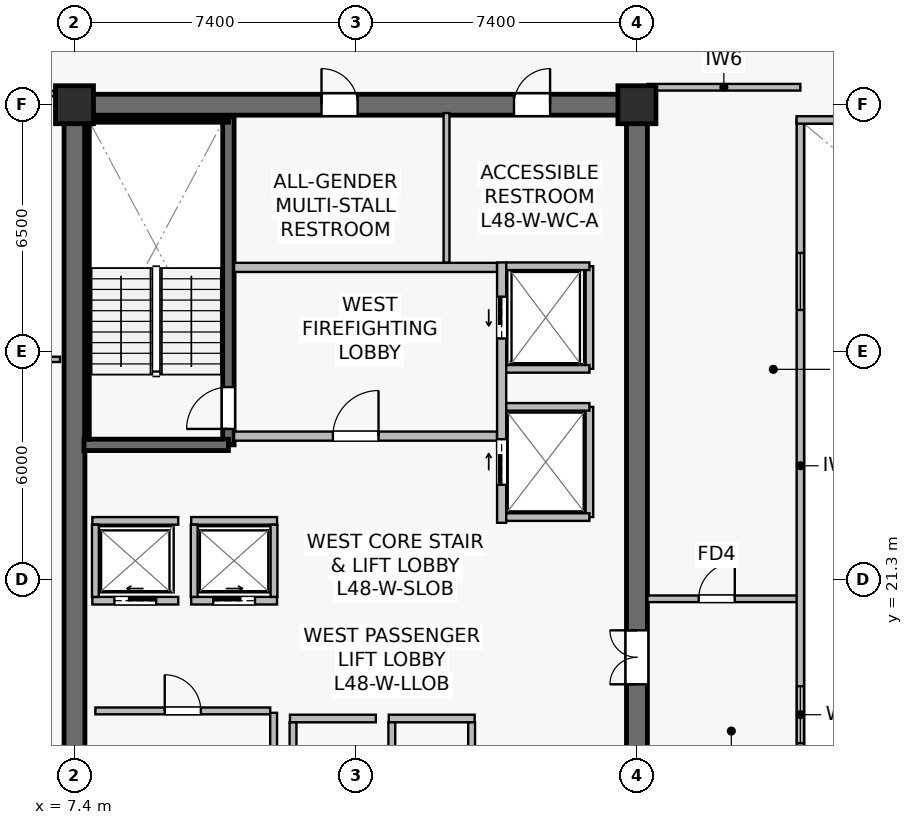
"""IFC4 building model, lengths in metres.
Left out: names, types, materials, properties, quantities, classifications, styles, units other than length and angle.
Written with IfcOpenShell. Run it as: python <this file> out.ifc"""

import sys

from ifc_helpers import new_model, si_unit, direction, frame, frame_2d, origin, origin_2d, place, context, subcontext, project, spatial, rectangle, extrude, source, transform, mapped, element, fill, save


model = new_model("IFC4")
c1 = context("Model", 3, precision=1e-05, world=origin(), true_north=direction((0.0, 1.0)))
c2 = subcontext(c1, "Body", "Model", "MODEL_VIEW")
j1 = project(units=[si_unit("LENGTHUNIT", "METRE"), si_unit("PLANEANGLEUNIT", "RADIAN")], contexts=[c1])
p1 = place(None, origin())
s1 = spatial("IfcSite", under=j1, at=p1, CompositionType="ELEMENT")
p2 = place(p1, origin())
s2 = spatial("IfcBuilding", under=s1, at=p2, CompositionType="ELEMENT")
p3 = place(p2, frame((0.0, 0.0, 201.4)))
s3 = spatial("IfcBuildingStorey", under=s2, at=p3, CompositionType="ELEMENT", Elevation=201.4)
p4 = place(p3, frame((7.125, 33.8, 0.0), z_axis=(0.0, 0.0, 1.0), x_axis=(1.0, 0.0, 0.0)))
e1 = element("IfcWall", 1, at=p4, inside=s3, PredefinedType="SHEAR", context=c2, shape_type="SweptSolid", body=[
    extrude(rectangle(XDim=15.35, YDim=0.55, at=frame_2d((7.675, 0.0))), origin(), (0.0, 0.0, 1.0), 3.8),
])
p5 = place(p4, frame((6.775, 0.0, 0.0)))
e2 = element("IfcOpeningElement", 2, at=p5, cuts=e1, PredefinedType="OPENING", context=c2, shape_type="SweptSolid", body=[
    extrude(rectangle(XDim=0.95, YDim=2.15, at=frame_2d((0.475, 1.075))), frame((0.0, 0.285, 0.0), z_axis=(0.0, -1.0, 0.0), x_axis=(1.0, 0.0, 0.0)), (0.0, 0.0, 1.0), 0.57),
])
p6 = place(p4, frame((11.84, 0.0, 0.0)))
e3 = element("IfcOpeningElement", 3, at=p6, cuts=e1, PredefinedType="OPENING", context=c2, shape_type="SweptSolid", body=[
    extrude(rectangle(XDim=0.95, YDim=2.15, at=frame_2d((0.475, 1.075))), frame((0.0, 0.285, 0.0), z_axis=(0.0, -1.0, 0.0), x_axis=(1.0, 0.0, 0.0)), (0.0, 0.0, 1.0), 0.57),
])
p7 = place(p3, frame((7.4, 15.075, 0.0), z_axis=(0.0, 0.0, 1.0), x_axis=(0.0, 1.0, 0.0)))
e4 = element("IfcWall", 4, at=p7, inside=s3, PredefinedType="SHEAR", context=c2, shape_type="SweptSolid", body=[
    extrude(rectangle(XDim=18.45, YDim=0.55, at=frame_2d((9.225, 0.0))), origin(), (0.0, 0.0, 1.0), 3.8),
])
p8 = place(p3, frame((22.2, 15.075, 0.0), z_axis=(0.0, 0.0, 1.0), x_axis=(0.0, 1.0, 0.0)))
e5 = element("IfcWall", 5, at=p8, inside=s3, PredefinedType="SHEAR", context=c2, shape_type="SweptSolid", body=[
    extrude(rectangle(XDim=18.45, YDim=0.55, at=frame_2d((9.225, 0.0))), origin(), (0.0, 0.0, 1.0), 3.8),
])
p9 = place(p8, frame((3.475, 0.0, 0.0)))
e6 = element("IfcOpeningElement", 6, at=p9, cuts=e5, PredefinedType="OPENING", context=c2, shape_type="SweptSolid", body=[
    extrude(rectangle(XDim=1.42, YDim=2.2, at=frame_2d((0.71, 1.1))), frame((0.0, 0.285, 0.0), z_axis=(0.0, -1.0, 0.0), x_axis=(1.0, 0.0, 0.0)), (0.0, 0.0, 1.0), 0.57),
])
p10 = place(p3, frame((11.45, 24.85, 0.0), z_axis=(0.0, 0.0, 1.0), x_axis=(0.0, 1.0, 0.0)))
e7 = element("IfcWall", 7, at=p10, inside=s3, PredefinedType="SHEAR", context=c2, shape_type="SweptSolid", body=[
    extrude(rectangle(XDim=8.63, YDim=0.3, at=frame_2d((4.315, 0.0))), origin(), (0.0, 0.0, 1.0), 3.8),
])
p11 = place(p10, frame((0.42, 0.0, 0.0)))
e8 = element("IfcOpeningElement", 8, at=p11, cuts=e7, PredefinedType="OPENING", context=c2, shape_type="SweptSolid", body=[
    extrude(rectangle(XDim=1.1, YDim=2.15, at=frame_2d((0.55, 1.075))), frame((0.0, 0.16, 0.0), z_axis=(0.0, -1.0, 0.0), x_axis=(1.0, 0.0, 0.0)), (0.0, 0.0, 1.0), 0.32),
])
p12 = place(p3, frame((7.65, 24.85, 0.0), z_axis=(0.0, 0.0, 1.0), x_axis=(1.0, 0.0, 0.0)))
e9 = element("IfcWall", 9, at=p12, inside=s3, PredefinedType="SHEAR", context=c2, shape_type="SweptSolid", body=[
    extrude(rectangle(XDim=3.8, YDim=0.3, at=frame_2d((1.9, 0.0))), origin(), (0.0, 0.0, 1.0), 3.8),
])
p13 = place(p3, frame((7.73, 33.4, 0.0), z_axis=(0.0, 0.0, 1.0), x_axis=(1.0, 0.0, 0.0)))
e10 = element("IfcWall", 10, at=p13, inside=s3, PredefinedType="SOLIDWALL", context=c2, shape_type="SweptSolid", body=[
    extrude(rectangle(XDim=3.72, YDim=0.12, at=frame_2d((1.86, 0.0))), origin(), (0.0, 0.0, 1.0), 3.8),
])
p14 = place(p3, frame((7.73, 25.0, 0.0), z_axis=(0.0, 0.0, 1.0), x_axis=(0.0, 1.0, 0.0)))
e11 = element("IfcWall", 11, at=p14, inside=s3, PredefinedType="SOLIDWALL", context=c2, shape_type="SweptSolid", body=[
    extrude(rectangle(XDim=8.32, YDim=0.12, at=frame_2d((4.16, 0.0))), origin(), (0.0, 0.0, 1.0), 3.8),
])
m1 = source(origin(), c2, "Body", "SweptSolid", [
    extrude(rectangle(XDim=1.0, YDim=1.0, at=origin_2d()), origin(), (0.0, 0.0, 1.0), 4.1),
])
for number, where, z_axis, x_axis in (
    (12, (7.4, 33.8, 0.0), (0.0, 0.0, 1.0), (1.0, 0.0, 0.0)),
    (13, (22.2, 33.8, 0.0), (0.0, 0.0, 1.0), (1.0, 0.0, 0.0)),
):
    element("IfcColumn", number, at=place(p3, frame(where, z_axis=z_axis, x_axis=x_axis)), inside=s3, PredefinedType="COLUMN", context=c2, shape_type="MappedRepresentation", body=[
        mapped(m1, transform((0.0, 0.0, 0.0), scale=1.0)),
    ])
p15 = place(p3, frame((11.6, 25.08, 0.0), z_axis=(0.0, 0.0, 1.0), x_axis=(1.0, 0.0, 0.0)))
e14 = element("IfcWall", 14, at=p15, inside=s3, PredefinedType="SOLIDWALL", context=c2, shape_type="SweptSolid", body=[
    extrude(rectangle(XDim=6.92, YDim=0.24, at=frame_2d((3.46, 0.0))), origin(), (0.0, 0.0, 1.0), 3.197),
])
p16 = place(p15, frame((2.6, 0.0, 0.0)))
e15 = element("IfcOpeningElement", 15, at=p16, cuts=e14, PredefinedType="OPENING", context=c2, shape_type="SweptSolid", body=[
    extrude(rectangle(XDim=1.2, YDim=2.16, at=frame_2d((0.6, 1.08))), frame((0.0, 0.13, 0.0), z_axis=(0.0, -1.0, 0.0), x_axis=(1.0, 0.0, 0.0)), (0.0, 0.0, 1.0), 0.26),
])
p17 = place(p3, frame((11.6, 29.52, 0.0), z_axis=(0.0, 0.0, 1.0), x_axis=(1.0, 0.0, 0.0)))
e16 = element("IfcWall", 16, at=p17, inside=s3, PredefinedType="SOLIDWALL", context=c2, shape_type="SweptSolid", body=[
    extrude(rectangle(XDim=6.92, YDim=0.24, at=frame_2d((3.46, 0.0))), origin(), (0.0, 0.0, 1.0), 3.197),
])
p18 = place(p3, frame((18.64, 22.8, 0.0), z_axis=(0.0, 0.0, 1.0), x_axis=(0.0, 1.0, 0.0)))
e17 = element("IfcWall", 17, at=p18, inside=s3, PredefinedType="SOLIDWALL", context=c2, shape_type="SweptSolid", body=[
    extrude(rectangle(XDim=6.85, YDim=0.24, at=frame_2d((3.425, 0.0))), origin(), (0.0, 0.0, 1.0), 2.935),
])
p19 = place(p18, frame((4.85, 0.0, 0.0)))
e18 = element("IfcOpeningElement", 18, at=p19, cuts=e17, PredefinedType="OPENING", context=c2, shape_type="SweptSolid", body=[
    extrude(rectangle(XDim=1.1, YDim=2.22, at=frame_2d((0.55, 1.11))), frame((0.0, 0.13, 0.0), z_axis=(0.0, -1.0, 0.0), x_axis=(1.0, 0.0, 0.0)), (0.0, 0.0, 1.0), 0.26),
])
p20 = place(p18, frame((1.0, 0.0, 0.0)))
e19 = element("IfcOpeningElement", 19, at=p20, cuts=e17, PredefinedType="OPENING", context=c2, shape_type="SweptSolid", body=[
    extrude(rectangle(XDim=1.2, YDim=2.22, at=frame_2d((0.6, 1.11))), frame((0.0, 0.13, 0.0), z_axis=(0.0, -1.0, 0.0), x_axis=(1.0, 0.0, 0.0)), (0.0, 0.0, 1.0), 0.26),
])
p21 = place(p3, frame((13.07, 17.65, 0.0), z_axis=(0.0, 0.0, 1.0), x_axis=(1.0, 0.0, 0.0)))
e20 = element("IfcWall", 20, at=p21, inside=s3, PredefinedType="SOLIDWALL", context=c2, shape_type="SweptSolid", body=[
    extrude(rectangle(XDim=2.26, YDim=0.2, at=frame_2d((1.13, 0.0))), origin(), (0.0, 0.0, 1.0), 3.197),
])
p22 = place(p3, frame((13.15, 15.65, 0.0), z_axis=(0.0, 0.0, 1.0), x_axis=(0.0, 1.0, 0.0)))
e21 = element("IfcWall", 21, at=p22, inside=s3, PredefinedType="SOLIDWALL", context=c2, shape_type="SweptSolid", body=[
    extrude(rectangle(XDim=1.9, YDim=0.18, at=frame_2d((0.95, 0.0))), origin(), (0.0, 0.0, 1.0), 3.8),
])
p23 = place(p3, frame((15.67, 17.65, 0.0), z_axis=(0.0, 0.0, 1.0), x_axis=(1.0, 0.0, 0.0)))
e22 = element("IfcWall", 22, at=p23, inside=s3, PredefinedType="SOLIDWALL", context=c2, shape_type="SweptSolid", body=[
    extrude(rectangle(XDim=2.26, YDim=0.2, at=frame_2d((1.13, 0.0))), origin(), (0.0, 0.0, 1.0), 3.8),
])
for number, where, z_axis, x_axis in (
    (23, (15.75, 15.65, 0.0), (0.0, 0.0, 1.0), (0.0, 1.0, 0.0)),
    (24, (17.85, 15.65, 0.0), (0.0, 0.0, 1.0), (0.0, 1.0, 0.0)),
):
    element("IfcWall", number, at=place(p3, frame(where, z_axis=z_axis, x_axis=x_axis)), inside=s3, PredefinedType="SOLIDWALL", context=c2, shape_type="SweptSolid", body=[
        extrude(rectangle(XDim=1.9, YDim=0.18, at=frame_2d((0.95, 0.0))), origin(), (0.0, 0.0, 1.0), 3.8),
    ])
p24 = place(p3, frame((7.87, 20.75, 0.0), z_axis=(0.0, 0.0, 1.0), x_axis=(1.0, 0.0, 0.0)))
e25 = element("IfcWall", 25, at=p24, inside=s3, PredefinedType="SOLIDWALL", context=c2, shape_type="SweptSolid", body=[
    extrude(rectangle(XDim=2.26, YDim=0.2, at=frame_2d((1.13, 0.0))), origin(), (0.0, 0.0, 1.0), 3.8),
])
p25 = place(p24, frame((0.58, 0.0, 0.0)))
e26 = element("IfcOpeningElement", 26, at=p25, cuts=e25, PredefinedType="OPENING", context=c2, shape_type="SweptSolid", body=[
    extrude(rectangle(XDim=1.1, YDim=2.22, at=frame_2d((0.55, 1.11))), frame((0.0, 0.11, 0.0), z_axis=(0.0, -1.0, 0.0), x_axis=(1.0, 0.0, 0.0)), (0.0, 0.0, 1.0), 0.22),
])
p26 = place(p3, frame((7.87, 22.85, 0.0), z_axis=(0.0, 0.0, 1.0), x_axis=(1.0, 0.0, 0.0)))
e27 = element("IfcWall", 27, at=p26, inside=s3, PredefinedType="SOLIDWALL", context=c2, shape_type="SweptSolid", body=[
    extrude(rectangle(XDim=2.26, YDim=0.2, at=frame_2d((1.13, 0.0))), origin(), (0.0, 0.0, 1.0), 3.8),
])
p27 = place(p3, frame((7.95, 20.85, 0.0), z_axis=(0.0, 0.0, 1.0), x_axis=(0.0, 1.0, 0.0)))
e28 = element("IfcWall", 28, at=p27, inside=s3, PredefinedType="SOLIDWALL", context=c2, shape_type="SweptSolid", body=[
    extrude(rectangle(XDim=1.9, YDim=0.18, at=frame_2d((0.95, 0.0))), origin(), (0.0, 0.0, 1.0), 3.8),
])
p28 = place(p3, frame((10.47, 20.75, 0.0), z_axis=(0.0, 0.0, 1.0), x_axis=(1.0, 0.0, 0.0)))
e29 = element("IfcWall", 29, at=p28, inside=s3, PredefinedType="SOLIDWALL", context=c2, shape_type="SweptSolid", body=[
    extrude(rectangle(XDim=2.26, YDim=0.2, at=frame_2d((1.13, 0.0))), origin(), (0.0, 0.0, 1.0), 3.8),
])
p29 = place(p28, frame((0.58, 0.0, 0.0)))
e30 = element("IfcOpeningElement", 30, at=p29, cuts=e29, PredefinedType="OPENING", context=c2, shape_type="SweptSolid", body=[
    extrude(rectangle(XDim=1.1, YDim=2.22, at=frame_2d((0.55, 1.11))), frame((0.0, 0.11, 0.0), z_axis=(0.0, -1.0, 0.0), x_axis=(1.0, 0.0, 0.0)), (0.0, 0.0, 1.0), 0.22),
])
p30 = place(p3, frame((10.47, 22.85, 0.0), z_axis=(0.0, 0.0, 1.0), x_axis=(1.0, 0.0, 0.0)))
e31 = element("IfcWall", 31, at=p30, inside=s3, PredefinedType="SOLIDWALL", context=c2, shape_type="SweptSolid", body=[
    extrude(rectangle(XDim=2.26, YDim=0.2, at=frame_2d((1.13, 0.0))), origin(), (0.0, 0.0, 1.0), 3.8),
])
for number, where, z_axis, x_axis in (
    (32, (10.55, 20.85, 0.0), (0.0, 0.0, 1.0), (0.0, 1.0, 0.0)),
    (33, (12.65, 20.85, 0.0), (0.0, 0.0, 1.0), (0.0, 1.0, 0.0)),
):
    element("IfcWall", number, at=place(p3, frame(where, z_axis=z_axis, x_axis=x_axis)), inside=s3, PredefinedType="SOLIDWALL", context=c2, shape_type="SweptSolid", body=[
        extrude(rectangle(XDim=1.9, YDim=0.18, at=frame_2d((0.95, 0.0))), origin(), (0.0, 0.0, 1.0), 3.8),
    ])
p31 = place(p3, frame((20.95, 26.85, 0.0), z_axis=(0.0, 0.0, 1.0), x_axis=(0.0, 1.0, 0.0)))
e34 = element("IfcWall", 34, at=p31, inside=s3, PredefinedType="SOLIDWALL", context=c2, shape_type="SweptSolid", body=[
    extrude(rectangle(XDim=2.7, YDim=0.2, at=frame_2d((1.35, 0.0))), origin(), (0.0, 0.0, 1.0), 3.8),
])
p32 = place(p3, frame((18.76, 29.55, 0.0), z_axis=(0.0, 0.0, 1.0), x_axis=(1.0, 0.0, 0.0)))
e35 = element("IfcWall", 35, at=p32, inside=s3, PredefinedType="SOLIDWALL", context=c2, shape_type="SweptSolid", body=[
    extrude(rectangle(XDim=2.19, YDim=0.2, at=frame_2d((1.095, 0.0))), origin(), (0.0, 0.0, 1.0), 3.8),
])
p33 = place(p3, frame((18.76, 26.85, 0.0), z_axis=(0.0, 0.0, 1.0), x_axis=(1.0, 0.0, 0.0)))
e36 = element("IfcWall", 36, at=p33, inside=s3, PredefinedType="SOLIDWALL", context=c2, shape_type="SweptSolid", body=[
    extrude(rectangle(XDim=2.19, YDim=0.2, at=frame_2d((1.095, 0.0))), origin(), (0.0, 0.0, 1.0), 3.197),
])
p34 = place(p3, frame((20.95, 22.95, 0.0), z_axis=(0.0, 0.0, 1.0), x_axis=(0.0, 1.0, 0.0)))
e37 = element("IfcWall", 37, at=p34, inside=s3, PredefinedType="SOLIDWALL", context=c2, shape_type="SweptSolid", body=[
    extrude(rectangle(XDim=2.9, YDim=0.2, at=frame_2d((1.45, 0.0))), origin(), (0.0, 0.0, 1.0), 2.935),
])
for number, where, z_axis, x_axis in (
    (38, (18.76, 25.85, 0.0), (0.0, 0.0, 1.0), (1.0, 0.0, 0.0)),
    (39, (18.76, 22.95, 0.0), (0.0, 0.0, 1.0), (1.0, 0.0, 0.0)),
):
    element("IfcWall", number, at=place(p3, frame(where, z_axis=z_axis, x_axis=x_axis)), inside=s3, PredefinedType="SOLIDWALL", context=c2, shape_type="SweptSolid", body=[
        extrude(rectangle(XDim=2.19, YDim=0.2, at=frame_2d((1.095, 0.0))), origin(), (0.0, 0.0, 1.0), 3.8),
    ])
p35 = place(p3, frame((7.95, 17.85, 0.0), z_axis=(0.0, 0.0, 1.0), x_axis=(1.0, 0.0, 0.0)))
e40 = element("IfcWall", 40, at=p35, inside=s3, PredefinedType="SOLIDWALL", context=c2, shape_type="SweptSolid", body=[
    extrude(rectangle(XDim=4.6, YDim=0.18, at=frame_2d((2.3, 0.0))), origin(), (0.0, 0.0, 1.0), 3.8),
])
p36 = place(p35, frame((1.825, 0.0, 0.0)))
e41 = element("IfcOpeningElement", 41, at=p36, cuts=e40, PredefinedType="OPENING", context=c2, shape_type="SweptSolid", body=[
    extrude(rectangle(XDim=0.95, YDim=2.15, at=frame_2d((0.475, 1.075))), frame((0.0, 0.1, 0.0), z_axis=(0.0, -1.0, 0.0), x_axis=(1.0, 0.0, 0.0)), (0.0, 0.0, 1.0), 0.2),
])
p37 = place(p3, frame((12.64, 15.4, 0.0), z_axis=(0.0, 0.0, 1.0), x_axis=(0.0, 1.0, 0.0)))
e42 = element("IfcWall", 42, at=p37, inside=s3, PredefinedType="SOLIDWALL", context=c2, shape_type="SweptSolid", body=[
    extrude(rectangle(XDim=2.4, YDim=0.18, at=frame_2d((1.2, 0.0))), origin(), (0.0, 0.0, 1.0), 3.8),
])
p38 = place(p3, frame((17.19, 29.65, 0.0), z_axis=(0.0, 0.0, 1.0), x_axis=(0.0, 1.0, 0.0)))
e43 = element("IfcWall", 43, at=p38, inside=s3, PredefinedType="PLUMBINGWALL", context=c2, shape_type="SweptSolid", body=[
    extrude(rectangle(XDim=3.93, YDim=0.155, at=frame_2d((1.965, 0.0))), origin(), (0.0, 0.0, 1.0), 3.8),
])
p39 = place(p3, frame((22.475, 34.26, 0.0), z_axis=(0.0, 0.0, 1.0), x_axis=(1.0, 0.0, 0.0)))
e44 = element("IfcWall", 44, at=p39, inside=s3, PredefinedType="PARTITIONING", context=c2, shape_type="SweptSolid", body=[
    extrude(rectangle(XDim=4.025, YDim=0.175, at=frame_2d((2.012, 0.0))), origin(), (0.0, 0.0, 1.0), 3.485),
])
p40 = place(p3, frame((22.475, 20.8, 0.0), z_axis=(0.0, 0.0, 1.0), x_axis=(1.0, 0.0, 0.0)))
e45 = element("IfcWall", 45, at=p40, inside=s3, PredefinedType="PARTITIONING", context=c2, shape_type="SweptSolid", body=[
    extrude(rectangle(XDim=4.025, YDim=0.175, at=frame_2d((2.012, 0.0))), origin(), (0.0, 0.0, 1.0), 3.8),
])
p41 = place(p40, frame((1.35, 0.0, 0.0)))
e46 = element("IfcOpeningElement", 46, at=p41, cuts=e45, PredefinedType="OPENING", context=c2, shape_type="SweptSolid", body=[
    extrude(rectangle(XDim=0.95, YDim=2.15, at=frame_2d((0.475, 1.075))), frame((0.0, 0.098, 0.0), z_axis=(0.0, -1.0, 0.0), x_axis=(1.0, 0.0, 0.0)), (0.0, 0.0, 1.0), 0.195),
])
p42 = place(p3, frame((26.5, 15.2, 0.0), z_axis=(0.0, 0.0, 1.0), x_axis=(0.0, 1.0, 0.0)))
e47 = element("IfcWall", 47, at=p42, inside=s3, PredefinedType="SOLIDWALL", context=c2, shape_type="SweptSolid", body=[
    extrude(rectangle(XDim=18.2, YDim=0.195, at=frame_2d((9.1, 0.0))), origin(), (0.0, 0.0, 1.0), 3.8),
])
p43 = place(p42, frame((1.8, 0.0, 0.9)))
e48 = element("IfcOpeningElement", 48, at=p43, cuts=e47, PredefinedType="OPENING", context=c2, shape_type="SweptSolid", body=[
    extrude(rectangle(XDim=1.5, YDim=1.4, at=frame_2d((0.75, 0.7))), frame((0.0, 0.107, 0.0), z_axis=(0.0, -1.0, 0.0), x_axis=(1.0, 0.0, 0.0)), (0.0, 0.0, 1.0), 0.215),
])
p44 = place(p42, frame((13.2, 0.0, 0.9)))
e49 = element("IfcOpeningElement", 49, at=p44, cuts=e47, PredefinedType="OPENING", context=c2, shape_type="SweptSolid", body=[
    extrude(rectangle(XDim=1.5, YDim=1.4, at=frame_2d((0.75, 0.7))), frame((0.0, 0.107, 0.0), z_axis=(0.0, -1.0, 0.0), x_axis=(1.0, 0.0, 0.0)), (0.0, 0.0, 1.0), 0.215),
])
p45 = place(p3, frame((26.4, 33.4, 0.0), z_axis=(0.0, 0.0, 1.0), x_axis=(1.0, 0.0, 0.0)))
e50 = element("IfcWall", 50, at=p45, inside=s3, PredefinedType="SOLIDWALL", context=c2, shape_type="SweptSolid", body=[
    extrude(rectangle(XDim=22.0, YDim=0.195, at=frame_2d((11.0, 0.0))), origin(), (0.0, 0.0, 1.0), 3.8),
])
p46 = place(p3, frame((4.11, 27.1, 0.0), z_axis=(0.0, 0.0, 1.0), x_axis=(1.0, 0.0, 0.0)))
e51 = element("IfcWall", 51, at=p46, inside=s3, PredefinedType="PARTITIONING", context=c2, shape_type="SweptSolid", body=[
    extrude(rectangle(XDim=2.91, YDim=0.14, at=frame_2d((1.455, 0.0))), origin(), (0.0, 0.0, 1.0), 3.8),
])
p47 = place(p3, frame((4.11, 34.095, 0.0), z_axis=(0.0, 0.0, 1.0), x_axis=(1.0, 0.0, 0.0)))
e52 = element("IfcWall", 52, at=p47, inside=s3, PredefinedType="PARTITIONING", context=c2, shape_type="SweptSolid", body=[
    extrude(rectangle(XDim=2.91, YDim=0.14, at=frame_2d((1.455, 0.0))), origin(), (0.0, 0.0, 1.0), 3.8),
])
p48 = place(p47, frame((1.005, 0.0, 0.0)))
e53 = element("IfcOpeningElement", 53, at=p48, cuts=e52, PredefinedType="OPENING", context=c2, shape_type="SweptSolid", body=[
    extrude(rectangle(XDim=0.9, YDim=2.1, at=frame_2d((0.45, 1.05))), frame((0.0, 0.08, 0.0), z_axis=(0.0, -1.0, 0.0), x_axis=(1.0, 0.0, 0.0)), (0.0, 0.0, 1.0), 0.16),
])
m2 = source(origin(), c2, "Body", "SweptSolid", [
    extrude(rectangle(XDim=1.5, YDim=1.4, at=frame_2d((0.75, 0.7))), frame((0.0, 0.03, 0.0), z_axis=(0.0, -1.0, 0.0), x_axis=(1.0, 0.0, 0.0)), (0.0, 0.0, 1.0), 0.06),
])
p49 = place(p43, origin())
e54 = element("IfcWindow", 54, at=p49, inside=s3, PartitioningType="SINGLE_PANEL", PredefinedType="WINDOW", context=c2, shape_type="MappedRepresentation", body=[
    mapped(m2, transform((0.0, 0.0, 0.0), scale=1.0)),
])
fill(e48, e54)
p50 = place(p44, origin())
e55 = element("IfcWindow", 55, at=p50, inside=s3, PartitioningType="SINGLE_PANEL", PredefinedType="WINDOW", context=c2, shape_type="MappedRepresentation", body=[
    mapped(m2, transform((0.0, 0.0, 0.0), scale=1.0)),
])
fill(e49, e55)
m3 = source(origin(), c2, "Body", "SweptSolid", [
    extrude(rectangle(XDim=1.1, YDim=2.15, at=frame_2d((0.55, 1.075))), frame((0.0, 0.025, 0.0), z_axis=(0.0, -1.0, 0.0), x_axis=(1.0, 0.0, 0.0)), (0.0, 0.0, 1.0), 0.05),
])
p51 = place(p11, origin())
e56 = element("IfcDoor", 56, at=p51, inside=s3, OperationType="SINGLE_SWING_LEFT", PredefinedType="DOOR", context=c2, shape_type="MappedRepresentation", body=[
    mapped(m3, transform((0.0, 0.0, 0.0), scale=1.0)),
])
fill(e8, e56)
m4 = source(origin(), c2, "Body", "SweptSolid", [
    extrude(rectangle(XDim=1.2, YDim=2.16, at=frame_2d((0.6, 1.08))), frame((0.0, 0.025, 0.0), z_axis=(0.0, -1.0, 0.0), x_axis=(1.0, 0.0, 0.0)), (0.0, 0.0, 1.0), 0.05),
])
p52 = place(p16, origin())
e57 = element("IfcDoor", 57, at=p52, inside=s3, OperationType="SINGLE_SWING_RIGHT", PredefinedType="DOOR", context=c2, shape_type="MappedRepresentation", body=[
    mapped(m4, transform((0.0, 0.0, 0.0), scale=1.0)),
])
fill(e15, e57)
m5 = source(origin(), c2, "Body", "SweptSolid", [
    extrude(rectangle(XDim=1.1, YDim=2.22, at=frame_2d((0.55, 1.11))), frame((0.0, 0.025, 0.0), z_axis=(0.0, -1.0, 0.0), x_axis=(1.0, 0.0, 0.0)), (0.0, 0.0, 1.0), 0.05),
])
p53 = place(p25, origin())
e58 = element("IfcDoor", 58, at=p53, inside=s3, OperationType="SLIDING_TO_LEFT", PredefinedType="USERDEFINED", context=c2, shape_type="MappedRepresentation", body=[
    mapped(m5, transform((0.0, 0.0, 0.0), scale=1.0)),
])
fill(e26, e58)
p54 = place(p29, origin())
e59 = element("IfcDoor", 59, at=p54, inside=s3, OperationType="SLIDING_TO_RIGHT", PredefinedType="USERDEFINED", context=c2, shape_type="MappedRepresentation", body=[
    mapped(m5, transform((0.0, 0.0, 0.0), scale=1.0)),
])
fill(e30, e59)
p55 = place(p19, origin())
e60 = element("IfcDoor", 60, at=p55, inside=s3, OperationType="SLIDING_TO_LEFT", PredefinedType="USERDEFINED", context=c2, shape_type="MappedRepresentation", body=[
    mapped(m5, transform((0.0, 0.0, 0.0), scale=1.0)),
])
fill(e18, e60)
m6 = source(origin(), c2, "Body", "SweptSolid", [
    extrude(rectangle(XDim=1.2, YDim=2.22, at=frame_2d((0.6, 1.11))), frame((0.0, 0.025, 0.0), z_axis=(0.0, -1.0, 0.0), x_axis=(1.0, 0.0, 0.0)), (0.0, 0.0, 1.0), 0.05),
])
p56 = place(p20, origin())
e61 = element("IfcDoor", 61, at=p56, inside=s3, OperationType="SLIDING_TO_RIGHT", PredefinedType="USERDEFINED", context=c2, shape_type="MappedRepresentation", body=[
    mapped(m6, transform((0.0, 0.0, 0.0), scale=1.0)),
])
fill(e19, e61)
m7 = source(origin(), c2, "Body", "SweptSolid", [
    extrude(rectangle(XDim=0.95, YDim=2.15, at=frame_2d((0.475, 1.075))), frame((0.0, 0.025, 0.0), z_axis=(0.0, -1.0, 0.0), x_axis=(1.0, 0.0, 0.0)), (0.0, 0.0, 1.0), 0.05),
])
p57 = place(p36, origin())
e62 = element("IfcDoor", 62, at=p57, inside=s3, OperationType="SINGLE_SWING_LEFT", PredefinedType="DOOR", context=c2, shape_type="MappedRepresentation", body=[
    mapped(m7, transform((0.0, 0.0, 0.0), scale=1.0)),
])
fill(e41, e62)
m8 = source(origin(), c2, "Body", "SweptSolid", [
    extrude(rectangle(XDim=1.42, YDim=2.2, at=frame_2d((0.71, 1.1))), frame((0.0, 0.025, 0.0), z_axis=(0.0, -1.0, 0.0), x_axis=(1.0, 0.0, 0.0)), (0.0, 0.0, 1.0), 0.05),
])
p58 = place(p9, origin())
e63 = element("IfcDoor", 63, at=p58, inside=s3, OperationType="DOUBLE_DOOR_SINGLE_SWING", PredefinedType="DOOR", context=c2, shape_type="MappedRepresentation", body=[
    mapped(m8, transform((0.0, 0.0, 0.0), scale=1.0)),
])
fill(e6, e63)
p59 = place(p5, origin())
e64 = element("IfcDoor", 64, at=p59, inside=s3, OperationType="SINGLE_SWING_LEFT", PredefinedType="DOOR", context=c2, shape_type="MappedRepresentation", body=[
    mapped(m7, transform((0.0, 0.0, 0.0), scale=1.0)),
])
fill(e2, e64)
p60 = place(p6, origin())
e65 = element("IfcDoor", 65, at=p60, inside=s3, OperationType="SINGLE_SWING_RIGHT", PredefinedType="DOOR", context=c2, shape_type="MappedRepresentation", body=[
    mapped(m7, transform((0.0, 0.0, 0.0), scale=1.0)),
])
fill(e3, e65)
p61 = place(p41, origin())
e66 = element("IfcDoor", 66, at=p61, inside=s3, OperationType="SINGLE_SWING_RIGHT", PredefinedType="DOOR", context=c2, shape_type="MappedRepresentation", body=[
    mapped(m7, transform((0.0, 0.0, 0.0), scale=1.0)),
])
fill(e46, e66)
save(model, sys.argv[1])
